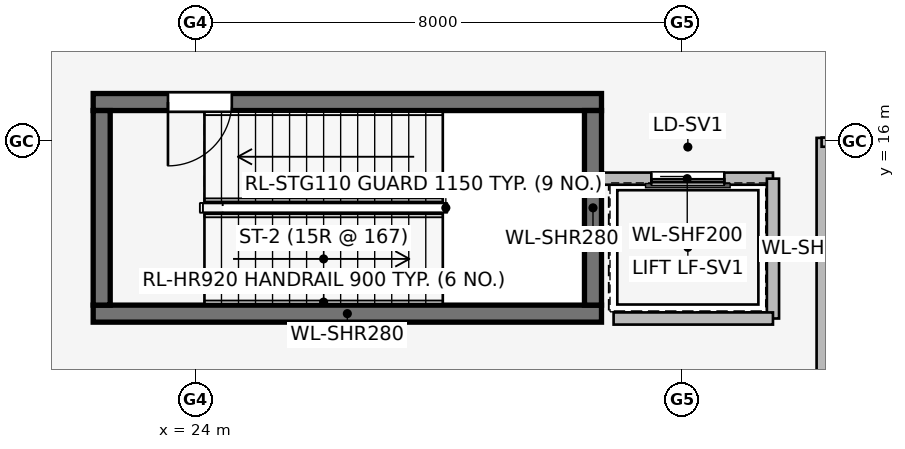
"""IFC4 building model, lengths in metres.
Left out: names, types, materials, properties, quantities, classifications, styles, units other than length and angle.
Written with IfcOpenShell. Run it as: python <this file> out.ifc"""

import sys

from ifc_helpers import new_model, si_unit, direction, frame, frame_2d, origin, place, context, subcontext, project, spatial, rectangle, extrude, element, fill, save


model = new_model("IFC4")
c1 = context("Model", 3, precision=1e-05, world=origin(), true_north=direction((0.0, 1.0)))
c2 = subcontext(c1, "Body", "Model", "MODEL_VIEW")
j1 = project(units=[si_unit("LENGTHUNIT", "METRE"), si_unit("PLANEANGLEUNIT", "RADIAN")], contexts=[c1])
p1 = place(None, origin())
s1 = spatial("IfcSite", under=j1, at=p1, CompositionType="ELEMENT")
p2 = place(p1, origin())
s2 = spatial("IfcBuilding", under=s1, at=p2, CompositionType="ELEMENT")
p3 = place(p2, frame((0.0, 0.0, 11.0)))
s3 = spatial("IfcBuildingStorey", under=s2, at=p3, CompositionType="ELEMENT", Elevation=11.0)
p4 = place(p3, frame((22.32, 13.16, 0.0), z_axis=(0.0, 0.0, 1.0), x_axis=(1.0, 0.0, 0.0)))
e1 = element("IfcWall", 1, at=p4, inside=s3, PredefinedType="SHEAR", context=c2, shape_type="SweptSolid", body=[
    extrude(rectangle(XDim=8.36, YDim=0.28, at=frame_2d((4.18, 0.0))), origin(), (0.0, 0.0, 1.0), 5.0),
])
p5 = place(p3, frame((30.68, 16.64, 0.0), z_axis=(0.0, 0.0, 1.0), x_axis=(-1.0, 0.0, 0.0)))
e2 = element("IfcWall", 2, at=p5, inside=s3, PredefinedType="SHEAR", context=c2, shape_type="SweptSolid", body=[
    extrude(rectangle(XDim=8.36, YDim=0.28, at=frame_2d((4.18, 0.0))), origin(), (0.0, 0.0, 1.0), 5.0),
])
p6 = place(p5, frame((6.08, 0.0, 0.0)))
e3 = element("IfcOpeningElement", 3, at=p6, cuts=e2, PredefinedType="OPENING", context=c2, shape_type="SweptSolid", body=[
    extrude(rectangle(XDim=1.05, YDim=2.0, at=frame_2d((0.525, 1.0))), frame((0.0, 0.15, 0.0), z_axis=(0.0, -1.0, 0.0), x_axis=(1.0, 0.0, 0.0)), (0.0, 0.0, 1.0), 0.3),
])
for number, where, z_axis, x_axis in (
    (4, (22.46, 16.5, 0.0), (0.0, 0.0, 1.0), (0.0, -1.0, 0.0)),
    (5, (30.54, 13.3, 0.0), (0.0, 0.0, 1.0), (0.0, 1.0, 0.0)),
):
    element("IfcWall", number, at=place(p3, frame(where, z_axis=z_axis, x_axis=x_axis)), inside=s3, PredefinedType="SHEAR", context=c2, shape_type="SweptSolid", body=[
        extrude(rectangle(XDim=3.2, YDim=0.28, at=frame_2d((1.6, 0.0))), origin(), (0.0, 0.0, 1.0), 5.0),
    ])
p7 = place(p3, frame((33.5, 15.38, 0.0), z_axis=(0.0, 0.0, 1.0), x_axis=(-1.0, 0.0, 0.0)))
e6 = element("IfcWall", 6, at=p7, inside=s3, PredefinedType="PARTITIONING", context=c2, shape_type="SweptSolid", body=[
    extrude(rectangle(XDim=2.82, YDim=0.2, at=frame_2d((1.41, 0.0))), origin(), (0.0, 0.0, 1.0), 4.69),
])
p8 = place(p7, frame((0.8, 0.0, 0.0)))
e7 = element("IfcOpeningElement", 7, at=p8, cuts=e6, PredefinedType="OPENING", context=c2, shape_type="SweptSolid", body=[
    extrude(rectangle(XDim=1.2, YDim=2.2, at=frame_2d((0.6, 1.1))), frame((0.0, 0.11, 0.0), z_axis=(0.0, -1.0, 0.0), x_axis=(1.0, 0.0, 0.0)), (0.0, 0.0, 1.0), 0.22),
])
p9 = place(p3, frame((33.5, 13.08, 0.0), z_axis=(0.0, 0.0, 1.0), x_axis=(0.0, 1.0, 0.0)))
e8 = element("IfcWall", 8, at=p9, inside=s3, PredefinedType="PARTITIONING", context=c2, shape_type="SweptSolid", body=[
    extrude(rectangle(XDim=2.3, YDim=0.2, at=frame_2d((1.15, 0.0))), origin(), (0.0, 0.0, 1.0), 4.69),
])
p10 = place(p3, frame((30.879, 13.08, 0.0), z_axis=(0.0, 0.0, 1.0), x_axis=(1.0, 0.0, 0.0)))
e9 = element("IfcWall", 9, at=p10, inside=s3, PredefinedType="PARTITIONING", context=c2, shape_type="SweptSolid", body=[
    extrude(rectangle(XDim=2.621, YDim=0.2, at=frame_2d((1.311, 0.0))), origin(), (0.0, 0.0, 1.0), 4.69),
])
p11 = place(p3, frame((34.3, 0.24, 0.0), z_axis=(0.0, 0.0, 1.0), x_axis=(0.0, 1.0, 0.0)))
e10 = element("IfcWall", 10, at=p11, inside=s3, PredefinedType="PARTITIONING", context=c2, shape_type="SweptSolid", body=[
    extrude(rectangle(XDim=15.81, YDim=0.165, at=frame_2d((7.905, 0.0))), origin(), (0.0, 0.0, 1.0), 4.69),
])
p12 = place(p3, frame((34.3, 15.98, 0.0), z_axis=(0.0, 0.0, 1.0), x_axis=(1.0, 0.0, 0.0)))
e11 = element("IfcWall", 11, at=p12, inside=s3, PredefinedType="PARTITIONING", context=c2, shape_type="SweptSolid", body=[
    extrude(rectangle(XDim=12.312, YDim=0.15, at=frame_2d((6.156, 0.0))), origin(), (0.0, 0.0, 1.0), 3.742),
])
p13 = place(p12, frame((5.676, 0.0, 0.0)))
e12 = element("IfcOpeningElement", 12, at=p13, cuts=e11, PredefinedType="OPENING", context=c2, shape_type="SweptSolid", body=[
    extrude(rectangle(XDim=0.96, YDim=2.0, at=frame_2d((0.48, 1.0))), frame((0.0, 0.085, 0.0), z_axis=(0.0, -1.0, 0.0), x_axis=(1.0, 0.0, 0.0)), (0.0, 0.0, 1.0), 0.17),
])
p14 = place(p6, origin())
e13 = element("IfcDoor", 13, at=p14, inside=s3, OperationType="SINGLE_SWING_RIGHT", PredefinedType="DOOR", context=c2, shape_type="SweptSolid", body=[
    extrude(rectangle(XDim=1.05, YDim=2.0, at=frame_2d((0.525, 1.0))), frame((0.0, 0.025, 0.0), z_axis=(0.0, -1.0, 0.0), x_axis=(1.0, 0.0, 0.0)), (0.0, 0.0, 1.0), 0.05),
])
fill(e3, e13)
p15 = place(p8, origin())
e14 = element("IfcDoor", 14, at=p15, inside=s3, OperationType="SLIDING_TO_RIGHT", PredefinedType="DOOR", context=c2, shape_type="SweptSolid", body=[
    extrude(rectangle(XDim=1.2, YDim=2.2, at=frame_2d((0.6, 1.1))), frame((0.0, 0.025, 0.0), z_axis=(0.0, -1.0, 0.0), x_axis=(1.0, 0.0, 0.0)), (0.0, 0.0, 1.0), 0.05),
])
fill(e7, e14)
save(model, sys.argv[1])
